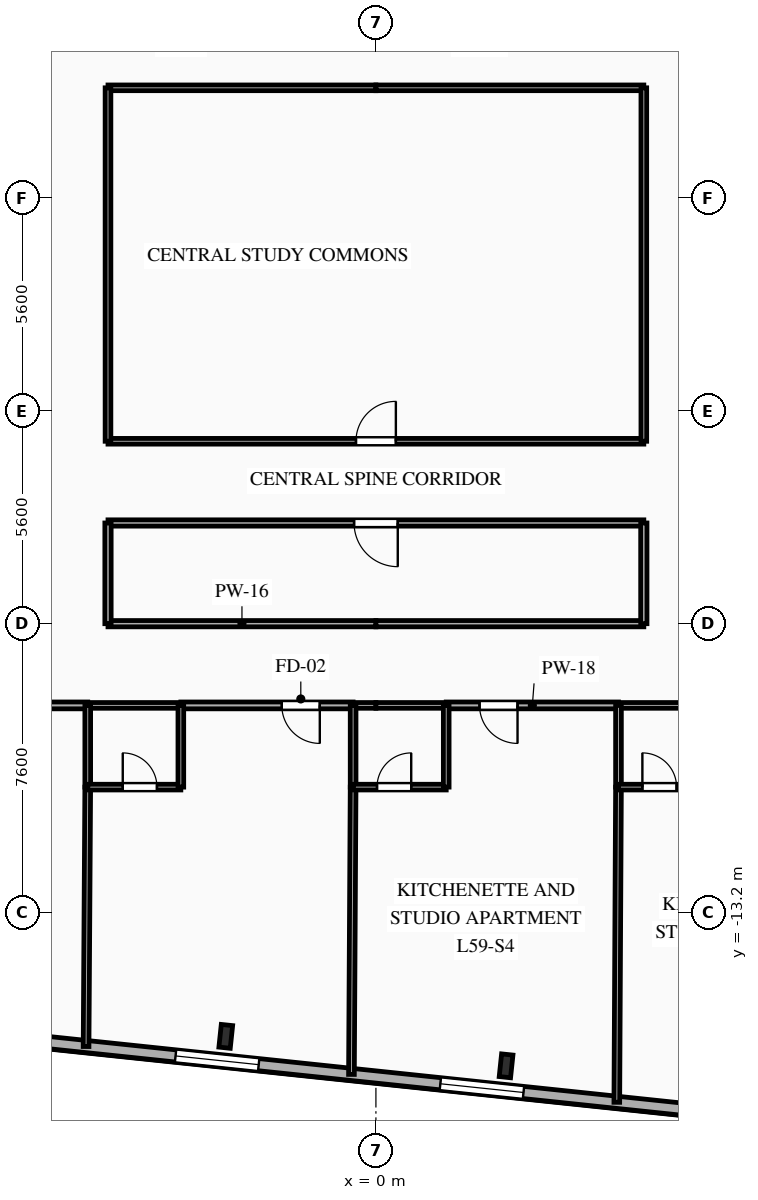
"""IFC4 building model, lengths in metres.
Left out: names, types, materials, properties, quantities, classifications, styles, units other than length and angle.
Written with IfcOpenShell. Run it as: python <this file> out.ifc"""

import sys

from ifc_helpers import new_model, si_unit, direction, frame, frame_2d, origin, origin_2d, place, context, subcontext, project, spatial, rectangle, i_section, extrude, element, fill, save


model = new_model("IFC4")
c1 = context("Model", 3, precision=1e-05, world=origin(), true_north=direction((0.0, 1.0)))
c2 = subcontext(c1, "Body", "Model", "MODEL_VIEW")
j1 = project(units=[si_unit("LENGTHUNIT", "METRE"), si_unit("PLANEANGLEUNIT", "RADIAN")], contexts=[c1])
p1 = place(None, origin())
s1 = spatial("IfcSite", under=j1, at=p1, CompositionType="ELEMENT")
p2 = place(p1, origin())
s2 = spatial("IfcBuilding", under=s1, at=p2, CompositionType="ELEMENT")
p3 = place(p2, frame((0.0, 0.0, 209.8)))
s3 = spatial("IfcBuildingStorey", under=s2, at=p3, CompositionType="ELEMENT", Elevation=209.8)
for number, where, z_axis, x_axis in (
    (1, (-3.951, -16.458, 0.0), (0.0, 0.0, 1.0), (0.995, -0.105, 0.0)),
    (2, (3.425, -17.233, 0.0), (0.0, 0.0, 1.0), (0.995, -0.105, 0.0)),
):
    element("IfcColumn", number, at=place(p3, frame(where, z_axis=z_axis, x_axis=x_axis)), inside=s3, PredefinedType="COLUMN", context=c2, shape_type="SweptSolid", body=[
        extrude(i_section(OverallWidth=0.3, OverallDepth=0.6, WebThickness=0.015, FlangeThickness=0.03, FilletRadius=0.027, at=origin_2d()), origin(), (0.0, 0.0, 1.0), 3.35),
    ])
p4 = place(p3, frame((18.756, -19.498, 0.0), z_axis=(0.0, 0.0, 1.0), x_axis=(-0.994522060044, 0.104526896475, 0.0)))
e3 = element("IfcWall", 3, at=p4, inside=s3, PredefinedType="SOLIDWALL", context=c2, shape_type="SweptSolid", body=[
    extrude(rectangle(XDim=45.8, YDim=0.32, at=frame_2d((22.9, 0.0))), origin(), (0.0, 0.0, 1.0), 3.04),
])
p5 = place(p4, frame((2.778, 0.0, 0.85)))
e4 = element("IfcOpeningElement", 4, at=p5, cuts=e3, PredefinedType="OPENING", context=c2, shape_type="SweptSolid", body=[
    extrude(rectangle(XDim=1.65, YDim=1.85, at=frame_2d((0.825, 0.925))), frame((0.0, 0.17, 0.0), z_axis=(0.0, -1.0, 0.0), x_axis=(1.0, 0.0, 0.0)), (0.0, 0.0, 1.0), 0.34),
])
p6 = place(p4, frame((7.948, 0.0, 0.85)))
e5 = element("IfcOpeningElement", 5, at=p6, cuts=e3, PredefinedType="OPENING", context=c2, shape_type="SweptSolid", body=[
    extrude(rectangle(XDim=2.2, YDim=1.85, at=frame_2d((1.1, 0.925))), frame((0.0, 0.17, 0.0), z_axis=(0.0, -1.0, 0.0), x_axis=(1.0, 0.0, 0.0)), (0.0, 0.0, 1.0), 0.34),
])
p7 = place(p4, frame((14.954, 0.0, 0.85)))
e6 = element("IfcOpeningElement", 6, at=p7, cuts=e3, PredefinedType="OPENING", context=c2, shape_type="SweptSolid", body=[
    extrude(rectangle(XDim=2.2, YDim=1.85, at=frame_2d((1.1, 0.925))), frame((0.0, 0.17, 0.0), z_axis=(0.0, -1.0, 0.0), x_axis=(1.0, 0.0, 0.0)), (0.0, 0.0, 1.0), 0.34),
])
p8 = place(p4, frame((21.96, 0.0, 0.85)))
e7 = element("IfcOpeningElement", 7, at=p8, cuts=e3, PredefinedType="OPENING", context=c2, shape_type="SweptSolid", body=[
    extrude(rectangle(XDim=2.2, YDim=1.85, at=frame_2d((1.1, 0.925))), frame((0.0, 0.17, 0.0), z_axis=(0.0, -1.0, 0.0), x_axis=(1.0, 0.0, 0.0)), (0.0, 0.0, 1.0), 0.34),
])
p9 = place(p4, frame((29.006, 0.0, 0.85)))
e8 = element("IfcOpeningElement", 8, at=p9, cuts=e3, PredefinedType="OPENING", context=c2, shape_type="SweptSolid", body=[
    extrude(rectangle(XDim=2.2, YDim=1.85, at=frame_2d((1.1, 0.925))), frame((0.0, 0.17, 0.0), z_axis=(0.0, -1.0, 0.0), x_axis=(1.0, 0.0, 0.0)), (0.0, 0.0, 1.0), 0.34),
])
p10 = place(p4, frame((35.429, 0.0, 0.85)))
e9 = element("IfcOpeningElement", 9, at=p10, cuts=e3, PredefinedType="OPENING", context=c2, shape_type="SweptSolid", body=[
    extrude(rectangle(XDim=1.65, YDim=1.85, at=frame_2d((0.825, 0.925))), frame((0.0, 0.17, 0.0), z_axis=(0.0, -1.0, 0.0), x_axis=(1.0, 0.0, 0.0)), (0.0, 0.0, 1.0), 0.34),
])
p11 = place(p4, frame((41.212, 0.0, 0.85)))
e10 = element("IfcOpeningElement", 10, at=p11, cuts=e3, PredefinedType="OPENING", context=c2, shape_type="SweptSolid", body=[
    extrude(rectangle(XDim=1.65, YDim=1.85, at=frame_2d((0.825, 0.925))), frame((0.0, 0.17, 0.0), z_axis=(0.0, -1.0, 0.0), x_axis=(1.0, 0.0, 0.0)), (0.0, 0.0, 1.0), 0.34),
])
for number, where, z_axis, x_axis in (
    (11, (0.0, 8.5, 0.0), (0.0, 0.0, 1.0), (-1.0, 0.0, 0.0)),
    (12, (7.05, 8.5, 0.0), (0.0, 0.0, 1.0), (-1.0, 0.0, 0.0)),
):
    element("IfcWall", number, at=place(p3, frame(where, z_axis=z_axis, x_axis=x_axis)), inside=s3, PredefinedType="PARTITIONING", context=c2, shape_type="SweptSolid", body=[
        extrude(rectangle(XDim=7.05, YDim=0.15, at=frame_2d((3.525, 0.0))), origin(), (0.0, 0.0, 1.0), 3.04),
    ])
p12 = place(p3, frame((-7.583, -7.75, 0.0), z_axis=(0.0, 0.0, 1.0), x_axis=(-1.0, 0.0, 0.0)))
e13 = element("IfcWall", 13, at=p12, inside=s3, PredefinedType="PARTITIONING", context=c2, shape_type="SweptSolid", body=[
    extrude(rectangle(XDim=4.534, YDim=0.18, at=frame_2d((2.267, 0.0))), origin(), (0.0, 0.0, 1.0), 3.04),
])
p13 = place(p12, frame((2.657, 0.0, 0.0)))
e14 = element("IfcOpeningElement", 14, at=p13, cuts=e13, PredefinedType="OPENING", context=c2, shape_type="SweptSolid", body=[
    extrude(rectangle(XDim=1.0, YDim=2.15, at=frame_2d((0.5, 1.075))), frame((0.0, 0.1, 0.0), z_axis=(0.0, -1.0, 0.0), x_axis=(1.0, 0.0, 0.0)), (0.0, 0.0, 1.0), 0.2),
])
p14 = place(p3, frame((-0.6, -7.75, 0.0), z_axis=(0.0, 0.0, 1.0), x_axis=(-1.0, 0.0, 0.0)))
e15 = element("IfcWall", 15, at=p14, inside=s3, PredefinedType="PARTITIONING", context=c2, shape_type="SweptSolid", body=[
    extrude(rectangle(XDim=4.533, YDim=0.18, at=frame_2d((2.267, 0.0))), origin(), (0.0, 0.0, 1.0), 3.04),
])
p15 = place(p14, frame((0.877, 0.0, 0.0)))
e16 = element("IfcOpeningElement", 16, at=p15, cuts=e15, PredefinedType="OPENING", context=c2, shape_type="SweptSolid", body=[
    extrude(rectangle(XDim=1.0, YDim=2.15, at=frame_2d((0.5, 1.075))), frame((0.0, 0.1, 0.0), z_axis=(0.0, -1.0, 0.0), x_axis=(1.0, 0.0, 0.0)), (0.0, 0.0, 1.0), 0.2),
])
p16 = place(p3, frame((-5.133, -7.75, 0.0), z_axis=(0.0, 0.0, 1.0), x_axis=(-1.0, 0.0, 0.0)))
e17 = element("IfcWall", 17, at=p16, inside=s3, PredefinedType="PLUMBINGWALL", context=c2, shape_type="SweptSolid", body=[
    extrude(rectangle(XDim=2.45, YDim=0.15, at=frame_2d((1.225, 0.0))), origin(), (0.0, 0.0, 1.0), 3.04),
])
p17 = place(p3, frame((0.0, -7.75, 0.0), z_axis=(0.0, 0.0, 1.0), x_axis=(-1.0, 0.0, 0.0)))
e18 = element("IfcWall", 18, at=p17, inside=s3, PredefinedType="PLUMBINGWALL", context=c2, shape_type="SweptSolid", body=[
    extrude(rectangle(XDim=0.6, YDim=0.15, at=frame_2d((0.3, 0.0))), origin(), (0.0, 0.0, 1.0), 3.04),
])
p18 = place(p3, frame((-7.05, -5.6, 0.0), z_axis=(0.0, 0.0, 1.0), x_axis=(1.0, 0.0, 0.0)))
e19 = element("IfcWall", 19, at=p18, inside=s3, PredefinedType="PARTITIONING", context=c2, shape_type="SweptSolid", body=[
    extrude(rectangle(XDim=7.05, YDim=0.165, at=frame_2d((3.525, 0.0))), origin(), (0.0, 0.0, 1.0), 2.525),
])
p19 = place(p3, frame((6.383, -7.75, 0.0), z_axis=(0.0, 0.0, 1.0), x_axis=(-1.0, 0.0, 0.0)))
e20 = element("IfcWall", 20, at=p19, inside=s3, PredefinedType="PARTITIONING", context=c2, shape_type="SweptSolid", body=[
    extrude(rectangle(XDim=4.533, YDim=0.18, at=frame_2d((2.267, 0.0))), origin(), (0.0, 0.0, 1.0), 3.04),
])
p20 = place(p19, frame((2.656, 0.0, 0.0)))
e21 = element("IfcOpeningElement", 21, at=p20, cuts=e20, PredefinedType="OPENING", context=c2, shape_type="SweptSolid", body=[
    extrude(rectangle(XDim=1.0, YDim=2.15, at=frame_2d((0.5, 1.075))), frame((0.0, 0.1, 0.0), z_axis=(0.0, -1.0, 0.0), x_axis=(1.0, 0.0, 0.0)), (0.0, 0.0, 1.0), 0.2),
])
p21 = place(p3, frame((1.85, -7.75, 0.0), z_axis=(0.0, 0.0, 1.0), x_axis=(-1.0, 0.0, 0.0)))
e22 = element("IfcWall", 22, at=p21, inside=s3, PredefinedType="PLUMBINGWALL", context=c2, shape_type="SweptSolid", body=[
    extrude(rectangle(XDim=1.85, YDim=0.15, at=frame_2d((0.925, 0.0))), origin(), (0.0, 0.0, 1.0), 3.04),
])
p22 = place(p3, frame((8.833, -7.75, 0.0), z_axis=(0.0, 0.0, 1.0), x_axis=(-1.0, 0.0, 0.0)))
e23 = element("IfcWall", 23, at=p22, inside=s3, PredefinedType="PLUMBINGWALL", context=c2, shape_type="SweptSolid", body=[
    extrude(rectangle(XDim=2.45, YDim=0.15, at=frame_2d((1.225, 0.0))), origin(), (0.0, 0.0, 1.0), 3.04),
])
p23 = place(p3, frame((0.0, -5.6, 0.0), z_axis=(0.0, 0.0, 1.0), x_axis=(1.0, 0.0, 0.0)))
e24 = element("IfcWall", 24, at=p23, inside=s3, PredefinedType="PARTITIONING", context=c2, shape_type="SweptSolid", body=[
    extrude(rectangle(XDim=7.05, YDim=0.165, at=frame_2d((3.525, 0.0))), origin(), (0.0, 0.0, 1.0), 2.525),
])
p24 = place(p3, frame((-7.05, -0.8, 0.0), z_axis=(0.0, 0.0, 1.0), x_axis=(1.0, 0.0, 0.0)))
e25 = element("IfcWall", 25, at=p24, inside=s3, PredefinedType="PARTITIONING", context=c2, shape_type="SweptSolid", body=[
    extrude(rectangle(XDim=14.1, YDim=0.15, at=frame_2d((7.05, 0.0))), origin(), (0.0, 0.0, 1.0), 3.04),
])
p25 = place(p24, frame((6.525, 0.0, 0.0)))
e26 = element("IfcOpeningElement", 26, at=p25, cuts=e25, PredefinedType="OPENING", context=c2, shape_type="SweptSolid", body=[
    extrude(rectangle(XDim=1.05, YDim=2.15, at=frame_2d((0.525, 1.075))), frame((0.0, 0.085, 0.0), z_axis=(0.0, -1.0, 0.0), x_axis=(1.0, 0.0, 0.0)), (0.0, 0.0, 1.0), 0.17),
])
p26 = place(p3, frame((7.05, -2.95, 0.0), z_axis=(0.0, 0.0, 1.0), x_axis=(-1.0, 0.0, 0.0)))
e27 = element("IfcWall", 27, at=p26, inside=s3, PredefinedType="PARTITIONING", context=c2, shape_type="SweptSolid", body=[
    extrude(rectangle(XDim=14.1, YDim=0.165, at=frame_2d((7.05, 0.0))), origin(), (0.0, 0.0, 1.0), 3.04),
])
p27 = place(p26, frame((6.475, 0.0, 0.0)))
e28 = element("IfcOpeningElement", 28, at=p27, cuts=e27, PredefinedType="OPENING", context=c2, shape_type="SweptSolid", body=[
    extrude(rectangle(XDim=1.15, YDim=2.15, at=frame_2d((0.575, 1.075))), frame((0.0, 0.093, 0.0), z_axis=(0.0, -1.0, 0.0), x_axis=(1.0, 0.0, 0.0)), (0.0, 0.0, 1.0), 0.185),
])
p28 = place(p3, frame((-7.05, 8.5, 0.0), z_axis=(0.0, 0.0, 1.0), x_axis=(0.0, -1.0, 0.0)))
e29 = element("IfcWall", 29, at=p28, inside=s3, PredefinedType="PARTITIONING", context=c2, shape_type="SweptSolid", body=[
    extrude(rectangle(XDim=9.3, YDim=0.15, at=frame_2d((4.65, 0.0))), origin(), (0.0, 0.0, 1.0), 3.04),
])
p29 = place(p3, frame((-7.05, -2.95, 0.0), z_axis=(0.0, 0.0, 1.0), x_axis=(0.0, -1.0, 0.0)))
e30 = element("IfcWall", 30, at=p29, inside=s3, PredefinedType="PARTITIONING", context=c2, shape_type="SweptSolid", body=[
    extrude(rectangle(XDim=2.65, YDim=0.165, at=frame_2d((1.325, 0.0))), origin(), (0.0, 0.0, 1.0), 3.04),
])
p30 = place(p3, frame((7.05, -0.8, 0.0), z_axis=(0.0, 0.0, 1.0), x_axis=(0.0, 1.0, 0.0)))
e31 = element("IfcWall", 31, at=p30, inside=s3, PredefinedType="PARTITIONING", context=c2, shape_type="SweptSolid", body=[
    extrude(rectangle(XDim=9.3, YDim=0.15, at=frame_2d((4.65, 0.0))), origin(), (0.0, 0.0, 1.0), 3.04),
])
p31 = place(p3, frame((7.05, -5.6, 0.0), z_axis=(0.0, 0.0, 1.0), x_axis=(0.0, 1.0, 0.0)))
e32 = element("IfcWall", 32, at=p31, inside=s3, PredefinedType="PARTITIONING", context=c2, shape_type="SweptSolid", body=[
    extrude(rectangle(XDim=2.65, YDim=0.165, at=frame_2d((1.325, 0.0))), origin(), (0.0, 0.0, 1.0), 3.04),
])
p32 = place(p3, frame((-7.583, -9.9, 0.0), z_axis=(0.0, 0.0, 1.0), x_axis=(-0.006438095341, -0.999979275249, 0.0)))
e33 = element("IfcWall", 33, at=p32, inside=s3, PredefinedType="PARTITIONING", context=c2, shape_type="SweptSolid", body=[
    extrude(rectangle(XDim=6.826, YDim=0.15, at=frame_2d((3.413, 0.0))), origin(), (0.0, 0.0, 1.0), 3.04),
])
p33 = place(p3, frame((-7.583, -7.75, 0.0), z_axis=(0.0, 0.0, 1.0), x_axis=(0.0, -1.0, 0.0)))
e34 = element("IfcWall", 34, at=p33, inside=s3, PredefinedType="PLUMBINGWALL", context=c2, shape_type="SweptSolid", body=[
    extrude(rectangle(XDim=2.15, YDim=0.15, at=frame_2d((1.075, 0.0))), origin(), (0.0, 0.0, 1.0), 3.04),
])
p34 = place(p3, frame((-7.583, -9.9, 0.0), z_axis=(0.0, 0.0, 1.0), x_axis=(1.0, 0.0, 0.0)))
e35 = element("IfcWall", 35, at=p34, inside=s3, PredefinedType="PLUMBINGWALL", context=c2, shape_type="SweptSolid", body=[
    extrude(rectangle(XDim=2.45, YDim=0.15, at=frame_2d((1.225, 0.0))), origin(), (0.0, 0.0, 1.0), 3.04),
])
p35 = place(p34, frame((0.921, 0.0, 0.0)))
e36 = element("IfcOpeningElement", 36, at=p35, cuts=e35, PredefinedType="OPENING", context=c2, shape_type="SweptSolid", body=[
    extrude(rectangle(XDim=0.9, YDim=2.1, at=frame_2d((0.45, 1.05))), frame((0.0, 0.085, 0.0), z_axis=(0.0, -1.0, 0.0), x_axis=(1.0, 0.0, 0.0)), (0.0, 0.0, 1.0), 0.17),
])
p36 = place(p3, frame((-5.133, -9.9, 0.0), z_axis=(0.0, 0.0, 1.0), x_axis=(0.0, 1.0, 0.0)))
e37 = element("IfcWall", 37, at=p36, inside=s3, PredefinedType="PLUMBINGWALL", context=c2, shape_type="SweptSolid", body=[
    extrude(rectangle(XDim=2.15, YDim=0.15, at=frame_2d((1.075, 0.0))), origin(), (0.0, 0.0, 1.0), 3.04),
])
p37 = place(p3, frame((-0.6, -9.9, 0.0), z_axis=(0.0, 0.0, 1.0), x_axis=(-0.005780810266, -0.999983290977, 0.0)))
e38 = element("IfcWall", 38, at=p37, inside=s3, PredefinedType="PARTITIONING", context=c2, shape_type="SweptSolid", body=[
    extrude(rectangle(XDim=7.56, YDim=0.15, at=frame_2d((3.78, 0.0))), origin(), (0.0, 0.0, 1.0), 3.04),
])
p38 = place(p3, frame((-0.6, -7.75, 0.0), z_axis=(0.0, 0.0, 1.0), x_axis=(0.0, -1.0, 0.0)))
e39 = element("IfcWall", 39, at=p38, inside=s3, PredefinedType="PLUMBINGWALL", context=c2, shape_type="SweptSolid", body=[
    extrude(rectangle(XDim=2.15, YDim=0.15, at=frame_2d((1.075, 0.0))), origin(), (0.0, 0.0, 1.0), 3.04),
])
p39 = place(p3, frame((-0.6, -9.9, 0.0), z_axis=(0.0, 0.0, 1.0), x_axis=(1.0, 0.0, 0.0)))
e40 = element("IfcWall", 40, at=p39, inside=s3, PredefinedType="PLUMBINGWALL", context=c2, shape_type="SweptSolid", body=[
    extrude(rectangle(XDim=2.45, YDim=0.15, at=frame_2d((1.225, 0.0))), origin(), (0.0, 0.0, 1.0), 3.04),
])
p40 = place(p39, frame((0.629, 0.0, 0.0)))
e41 = element("IfcOpeningElement", 41, at=p40, cuts=e40, PredefinedType="OPENING", context=c2, shape_type="SweptSolid", body=[
    extrude(rectangle(XDim=0.9, YDim=2.1, at=frame_2d((0.45, 1.05))), frame((0.0, 0.085, 0.0), z_axis=(0.0, -1.0, 0.0), x_axis=(1.0, 0.0, 0.0)), (0.0, 0.0, 1.0), 0.17),
])
p41 = place(p3, frame((1.85, -9.9, 0.0), z_axis=(0.0, 0.0, 1.0), x_axis=(0.0, 1.0, 0.0)))
e42 = element("IfcWall", 42, at=p41, inside=s3, PredefinedType="PLUMBINGWALL", context=c2, shape_type="SweptSolid", body=[
    extrude(rectangle(XDim=2.15, YDim=0.15, at=frame_2d((1.075, 0.0))), origin(), (0.0, 0.0, 1.0), 3.04),
])
p42 = place(p3, frame((6.383, -9.9, 0.0), z_axis=(0.0, 0.0, 1.0), x_axis=(-0.005298718667, -0.999985961692, 0.0)))
e43 = element("IfcWall", 43, at=p42, inside=s3, PredefinedType="PARTITIONING", context=c2, shape_type="SweptSolid", body=[
    extrude(rectangle(XDim=8.293, YDim=0.15, at=frame_2d((4.147, 0.0))), origin(), (0.0, 0.0, 1.0), 3.04),
])
p43 = place(p3, frame((6.383, -7.75, 0.0), z_axis=(0.0, 0.0, 1.0), x_axis=(0.0, -1.0, 0.0)))
e44 = element("IfcWall", 44, at=p43, inside=s3, PredefinedType="PLUMBINGWALL", context=c2, shape_type="SweptSolid", body=[
    extrude(rectangle(XDim=2.15, YDim=0.15, at=frame_2d((1.075, 0.0))), origin(), (0.0, 0.0, 1.0), 3.04),
])
p44 = place(p3, frame((6.383, -9.9, 0.0), z_axis=(0.0, 0.0, 1.0), x_axis=(1.0, 0.0, 0.0)))
e45 = element("IfcWall", 45, at=p44, inside=s3, PredefinedType="PLUMBINGWALL", context=c2, shape_type="SweptSolid", body=[
    extrude(rectangle(XDim=2.45, YDim=0.15, at=frame_2d((1.225, 0.0))), origin(), (0.0, 0.0, 1.0), 3.04),
])
p45 = place(p44, frame((0.629, 0.0, 0.0)))
e46 = element("IfcOpeningElement", 46, at=p45, cuts=e45, PredefinedType="OPENING", context=c2, shape_type="SweptSolid", body=[
    extrude(rectangle(XDim=0.9, YDim=2.1, at=frame_2d((0.45, 1.05))), frame((0.0, 0.085, 0.0), z_axis=(0.0, -1.0, 0.0), x_axis=(1.0, 0.0, 0.0)), (0.0, 0.0, 1.0), 0.17),
])
p46 = place(p7, origin())
e47 = element("IfcWindow", 47, at=p46, inside=s3, PartitioningType="SINGLE_PANEL", PredefinedType="WINDOW", context=c2, shape_type="SweptSolid", body=[
    extrude(rectangle(XDim=2.2, YDim=1.85, at=frame_2d((1.1, 0.925))), frame((0.0, 0.03, 0.0), z_axis=(0.0, -1.0, 0.0), x_axis=(1.0, 0.0, 0.0)), (0.0, 0.0, 1.0), 0.06),
])
fill(e6, e47)
p47 = place(p8, origin())
e48 = element("IfcWindow", 48, at=p47, inside=s3, PartitioningType="SINGLE_PANEL", PredefinedType="WINDOW", context=c2, shape_type="SweptSolid", body=[
    extrude(rectangle(XDim=2.2, YDim=1.85, at=frame_2d((1.1, 0.925))), frame((0.0, 0.03, 0.0), z_axis=(0.0, -1.0, 0.0), x_axis=(1.0, 0.0, 0.0)), (0.0, 0.0, 1.0), 0.06),
])
fill(e7, e48)
p48 = place(p15, origin())
e49 = element("IfcDoor", 49, at=p48, inside=s3, OperationType="SINGLE_SWING_LEFT", PredefinedType="DOOR", context=c2, shape_type="SweptSolid", body=[
    extrude(rectangle(XDim=1.0, YDim=2.15, at=frame_2d((0.5, 1.075))), frame((0.0, 0.025, 0.0), z_axis=(0.0, -1.0, 0.0), x_axis=(1.0, 0.0, 0.0)), (0.0, 0.0, 1.0), 0.05),
])
fill(e16, e49)
p49 = place(p20, origin())
e50 = element("IfcDoor", 50, at=p49, inside=s3, OperationType="SINGLE_SWING_LEFT", PredefinedType="DOOR", context=c2, shape_type="SweptSolid", body=[
    extrude(rectangle(XDim=1.0, YDim=2.15, at=frame_2d((0.5, 1.075))), frame((0.0, 0.025, 0.0), z_axis=(0.0, -1.0, 0.0), x_axis=(1.0, 0.0, 0.0)), (0.0, 0.0, 1.0), 0.05),
])
fill(e21, e50)
p50 = place(p25, origin())
e51 = element("IfcDoor", 51, at=p50, inside=s3, OperationType="SINGLE_SWING_RIGHT", PredefinedType="DOOR", context=c2, shape_type="SweptSolid", body=[
    extrude(rectangle(XDim=1.05, YDim=2.15, at=frame_2d((0.525, 1.075))), frame((0.0, 0.025, 0.0), z_axis=(0.0, -1.0, 0.0), x_axis=(1.0, 0.0, 0.0)), (0.0, 0.0, 1.0), 0.05),
])
fill(e26, e51)
p51 = place(p27, origin())
e52 = element("IfcDoor", 52, at=p51, inside=s3, OperationType="SINGLE_SWING_LEFT", PredefinedType="DOOR", context=c2, shape_type="SweptSolid", body=[
    extrude(rectangle(XDim=1.15, YDim=2.15, at=frame_2d((0.575, 1.075))), frame((0.0, 0.025, 0.0), z_axis=(0.0, -1.0, 0.0), x_axis=(1.0, 0.0, 0.0)), (0.0, 0.0, 1.0), 0.05),
])
fill(e28, e52)
p52 = place(p35, origin())
e53 = element("IfcDoor", 53, at=p52, inside=s3, OperationType="SINGLE_SWING_LEFT", PredefinedType="DOOR", context=c2, shape_type="SweptSolid", body=[
    extrude(rectangle(XDim=0.9, YDim=2.1, at=frame_2d((0.45, 1.05))), frame((0.0, 0.025, 0.0), z_axis=(0.0, -1.0, 0.0), x_axis=(1.0, 0.0, 0.0)), (0.0, 0.0, 1.0), 0.05),
])
fill(e36, e53)
p53 = place(p40, origin())
e54 = element("IfcDoor", 54, at=p53, inside=s3, OperationType="SINGLE_SWING_RIGHT", PredefinedType="DOOR", context=c2, shape_type="SweptSolid", body=[
    extrude(rectangle(XDim=0.9, YDim=2.1, at=frame_2d((0.45, 1.05))), frame((0.0, 0.025, 0.0), z_axis=(0.0, -1.0, 0.0), x_axis=(1.0, 0.0, 0.0)), (0.0, 0.0, 1.0), 0.05),
])
fill(e41, e54)
p54 = place(p45, origin())
e55 = element("IfcDoor", 55, at=p54, inside=s3, OperationType="SINGLE_SWING_LEFT", PredefinedType="DOOR", context=c2, shape_type="SweptSolid", body=[
    extrude(rectangle(XDim=0.9, YDim=2.1, at=frame_2d((0.45, 1.05))), frame((0.0, 0.025, 0.0), z_axis=(0.0, -1.0, 0.0), x_axis=(1.0, 0.0, 0.0)), (0.0, 0.0, 1.0), 0.05),
])
fill(e46, e55)
save(model, sys.argv[1])
